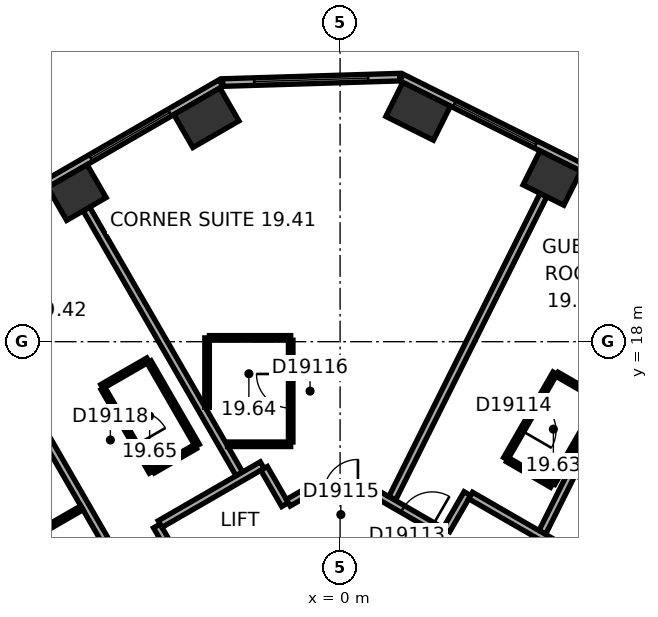
"""IFC4 building model, lengths in metres.
Left out: names, types, materials, properties, quantities, classifications, styles, units other than length and angle.
Written with IfcOpenShell. Run it as: python <this file> out.ifc"""

import sys

from ifc_helpers import new_model, si_unit, direction, frame, frame_2d, origin, origin_2d, place, context, subcontext, project, spatial, rectangle, extrude, element, fill, save


model = new_model("IFC4")
c1 = context("Model", 3, precision=1e-05, world=origin(), true_north=direction((0.0, 1.0)))
c2 = subcontext(c1, "Body", "Model", "MODEL_VIEW")
j1 = project(units=[si_unit("LENGTHUNIT", "METRE"), si_unit("PLANEANGLEUNIT", "RADIAN")], contexts=[c1])
p1 = place(None, origin())
s1 = spatial("IfcSite", under=j1, at=p1, CompositionType="ELEMENT")
p2 = place(p1, origin())
s2 = spatial("IfcBuilding", under=s1, at=p2, CompositionType="ELEMENT")
p3 = place(p2, frame((0.0, 0.0, 86.9)))
s3 = spatial("IfcBuildingStorey", under=s2, at=p3, CompositionType="ELEMENT", Elevation=86.9)
p4 = place(p3, frame((5.574, 22.306, 0.0), z_axis=(0.0, 0.0, 1.0), x_axis=(-0.894934361602, 0.44619781311, 0.0)))
e1 = element("IfcColumn", 1, at=p4, inside=s3, PredefinedType="COLUMN", context=c2, shape_type="SweptSolid", body=[
    extrude(rectangle(XDim=1.2, YDim=1.0, at=origin_2d()), origin(), (0.0, 0.0, 1.0), 3.3),
])
for number, where, z_axis, x_axis in (
    (2, (2.053, 24.062, 0.0), (0.0, 0.0, 1.0), (-0.895, 0.446, 0.0)),
    (3, (-3.518, 23.892, 0.0), (0.0, 0.0, 1.0), (-0.866, -0.5, 0.0)),
):
    element("IfcColumn", number, at=place(p3, frame(where, z_axis=z_axis, x_axis=x_axis)), inside=s3, PredefinedType="COLUMN", context=c2, shape_type="SweptSolid", body=[
        extrude(rectangle(XDim=1.4, YDim=1.0, at=origin_2d()), origin(), (0.0, 0.0, 1.0), 3.3),
    ])
p5 = place(p3, frame((-6.926, 21.925, 0.0), z_axis=(0.0, 0.0, 1.0), x_axis=(-0.866025403784, -0.5, 0.0)))
e4 = element("IfcColumn", 4, at=p5, inside=s3, PredefinedType="COLUMN", context=c2, shape_type="SweptSolid", body=[
    extrude(rectangle(XDim=1.2, YDim=1.0, at=origin_2d()), origin(), (0.0, 0.0, 1.0), 3.3),
])
p6 = place(p3, frame((20.63, 15.47, 0.0), z_axis=(0.0, 0.0, 1.0), x_axis=(-0.894934518609, 0.446197498203, 0.0)))
e5 = element("IfcWall", 5, at=p6, inside=s3, PredefinedType="STANDARD", context=c2, shape_type="SweptSolid", body=[
    extrude(rectangle(XDim=21.246, YDim=0.2, at=frame_2d((10.623, 0.0))), origin(), (0.0, 0.0, 1.0), 3.3),
])
p7 = place(p6, frame((1.553, 0.0, 0.8)))
e6 = element("IfcOpeningElement", 6, at=p7, cuts=e5, PredefinedType="OPENING", context=c2, shape_type="SweptSolid", body=[
    extrude(rectangle(XDim=2.4, YDim=1.7, at=frame_2d((1.2, 0.85))), frame((0.0, 0.11, 0.0), z_axis=(0.0, -1.0, 0.0), x_axis=(1.0, 0.0, 0.0)), (0.0, 0.0, 1.0), 0.22),
])
p8 = place(p6, frame((5.488, 0.0, 0.8)))
e7 = element("IfcOpeningElement", 7, at=p8, cuts=e5, PredefinedType="OPENING", context=c2, shape_type="SweptSolid", body=[
    extrude(rectangle(XDim=2.4, YDim=1.7, at=frame_2d((1.2, 0.85))), frame((0.0, 0.11, 0.0), z_axis=(0.0, -1.0, 0.0), x_axis=(1.0, 0.0, 0.0)), (0.0, 0.0, 1.0), 0.22),
])
p9 = place(p6, frame((9.422, 0.0, 0.8)))
e8 = element("IfcOpeningElement", 8, at=p9, cuts=e5, PredefinedType="OPENING", context=c2, shape_type="SweptSolid", body=[
    extrude(rectangle(XDim=2.4, YDim=1.7, at=frame_2d((1.2, 0.85))), frame((0.0, 0.11, 0.0), z_axis=(0.0, -1.0, 0.0), x_axis=(1.0, 0.0, 0.0)), (0.0, 0.0, 1.0), 0.22),
])
p10 = place(p6, frame((13.357, 0.0, 0.8)))
e9 = element("IfcOpeningElement", 9, at=p10, cuts=e5, PredefinedType="OPENING", context=c2, shape_type="SweptSolid", body=[
    extrude(rectangle(XDim=2.4, YDim=1.7, at=frame_2d((1.2, 0.85))), frame((0.0, 0.11, 0.0), z_axis=(0.0, -1.0, 0.0), x_axis=(1.0, 0.0, 0.0)), (0.0, 0.0, 1.0), 0.22),
])
p11 = place(p6, frame((17.292, 0.0, 0.8)))
e10 = element("IfcOpeningElement", 10, at=p11, cuts=e5, PredefinedType="OPENING", context=c2, shape_type="SweptSolid", body=[
    extrude(rectangle(XDim=2.4, YDim=1.7, at=frame_2d((1.2, 0.85))), frame((0.0, 0.11, 0.0), z_axis=(0.0, -1.0, 0.0), x_axis=(1.0, 0.0, 0.0)), (0.0, 0.0, 1.0), 0.22),
])
p12 = place(p3, frame((1.568, 24.961, 0.0), z_axis=(0.0, 0.0, 1.0), x_axis=(-0.999533359013, -0.030546099927, 0.0)))
e11 = element("IfcWall", 11, at=p12, inside=s3, PredefinedType="STANDARD", context=c2, shape_type="SweptSolid", body=[
    extrude(rectangle(XDim=4.66, YDim=0.2, at=frame_2d((2.33, 0.0))), origin(), (0.0, 0.0, 1.0), 3.3),
])
p13 = place(p12, frame((0.83, 0.0, 0.8)))
e12 = element("IfcOpeningElement", 12, at=p13, cuts=e11, PredefinedType="OPENING", context=c2, shape_type="SweptSolid", body=[
    extrude(rectangle(XDim=3.0, YDim=1.7, at=frame_2d((1.5, 0.85))), frame((0.0, 0.11, 0.0), z_axis=(0.0, -1.0, 0.0), x_axis=(1.0, 0.0, 0.0)), (0.0, 0.0, 1.0), 0.22),
])
p14 = place(p3, frame((-3.136, 24.805, 0.0), z_axis=(0.0, 0.0, 1.0), x_axis=(-0.866028291626, -0.499994998079, 0.0)))
e13 = element("IfcWall", 13, at=p14, inside=s3, PredefinedType="STANDARD", context=c2, shape_type="SweptSolid", body=[
    extrude(rectangle(XDim=21.246, YDim=0.2, at=frame_2d((10.623, 0.0))), origin(), (0.0, 0.0, 1.0), 3.3),
])
p15 = place(p14, frame((1.555, 0.0, 0.8)))
e14 = element("IfcOpeningElement", 14, at=p15, cuts=e13, PredefinedType="OPENING", context=c2, shape_type="SweptSolid", body=[
    extrude(rectangle(XDim=2.4, YDim=1.7, at=frame_2d((1.2, 0.85))), frame((0.0, 0.11, 0.0), z_axis=(0.0, -1.0, 0.0), x_axis=(1.0, 0.0, 0.0)), (0.0, 0.0, 1.0), 0.22),
])
p16 = place(p14, frame((5.489, 0.0, 0.8)))
e15 = element("IfcOpeningElement", 15, at=p16, cuts=e13, PredefinedType="OPENING", context=c2, shape_type="SweptSolid", body=[
    extrude(rectangle(XDim=2.4, YDim=1.7, at=frame_2d((1.2, 0.85))), frame((0.0, 0.11, 0.0), z_axis=(0.0, -1.0, 0.0), x_axis=(1.0, 0.0, 0.0)), (0.0, 0.0, 1.0), 0.22),
])
p17 = place(p14, frame((9.424, 0.0, 0.8)))
e16 = element("IfcOpeningElement", 16, at=p17, cuts=e13, PredefinedType="OPENING", context=c2, shape_type="SweptSolid", body=[
    extrude(rectangle(XDim=2.4, YDim=1.7, at=frame_2d((1.2, 0.85))), frame((0.0, 0.11, 0.0), z_axis=(0.0, -1.0, 0.0), x_axis=(1.0, 0.0, 0.0)), (0.0, 0.0, 1.0), 0.22),
])
p18 = place(p14, frame((13.358, 0.0, 0.8)))
e17 = element("IfcOpeningElement", 17, at=p18, cuts=e13, PredefinedType="OPENING", context=c2, shape_type="SweptSolid", body=[
    extrude(rectangle(XDim=2.4, YDim=1.7, at=frame_2d((1.2, 0.85))), frame((0.0, 0.11, 0.0), z_axis=(0.0, -1.0, 0.0), x_axis=(1.0, 0.0, 0.0)), (0.0, 0.0, 1.0), 0.22),
])
p19 = place(p14, frame((17.293, 0.0, 0.8)))
e18 = element("IfcOpeningElement", 18, at=p19, cuts=e13, PredefinedType="OPENING", context=c2, shape_type="SweptSolid", body=[
    extrude(rectangle(XDim=2.4, YDim=1.7, at=frame_2d((1.2, 0.85))), frame((0.0, 0.11, 0.0), z_axis=(0.0, -1.0, 0.0), x_axis=(1.0, 0.0, 0.0)), (0.0, 0.0, 1.0), 0.22),
])
p20 = place(p3, frame((-10.083, 19.524, 0.0), z_axis=(0.0, 0.0, 1.0), x_axis=(0.499999662836, -0.866025598446, 0.0)))
e19 = element("IfcWall", 19, at=p20, inside=s3, PredefinedType="PARTITIONING", context=c2, shape_type="SweptSolid", body=[
    extrude(rectangle(XDim=9.25, YDim=0.2, at=frame_2d((4.625, 0.0))), origin(), (0.0, 0.0, 1.0), 2.6),
])
p21 = place(p3, frame((-8.44, 12.679, 0.0), z_axis=(0.0, 0.0, 1.0), x_axis=(0.866044365799, 0.499967155389, 0.0)))
e20 = element("IfcWall", 20, at=p21, inside=s3, PredefinedType="PARTITIONING", context=c2, shape_type="SweptSolid", body=[
    extrude(rectangle(XDim=1.9, YDim=0.12, at=frame_2d((0.95, 0.0))), origin(), (0.0, 0.0, 1.0), 3.05),
])
p22 = place(p3, frame((-6.676, 21.492, 0.0), z_axis=(0.0, 0.0, 1.0), x_axis=(0.500011263043, -0.866018900966, 0.0)))
e21 = element("IfcWall", 21, at=p22, inside=s3, PredefinedType="PARTITIONING", context=c2, shape_type="SweptSolid", body=[
    extrude(rectangle(XDim=8.049, YDim=0.2, at=frame_2d((4.024, 0.0))), origin(), (0.0, 0.0, 1.0), 3.05),
])
p23 = place(p3, frame((-6.268, 16.82, 0.0), z_axis=(0.0, 0.0, 1.0), x_axis=(0.866002662425, 0.500039387122, 0.0)))
e22 = element("IfcWall", 22, at=p23, inside=s3, PredefinedType="PARTITIONING", context=c2, shape_type="SweptSolid", body=[
    extrude(rectangle(XDim=1.4, YDim=0.12, at=frame_2d((0.7, 0.0))), origin(), (0.0, 0.0, 1.0), 3.05),
])
p24 = place(p3, frame((-5.026, 17.469, 0.0), z_axis=(0.0, 0.0, 1.0), x_axis=(0.500005339912, -0.866022320763, 0.0)))
e23 = element("IfcWall", 23, at=p24, inside=s3, PredefinedType="PARTITIONING", context=c2, shape_type="SweptSolid", body=[
    extrude(rectangle(XDim=2.54, YDim=0.12, at=frame_2d((1.27, 0.0))), origin(), (0.0, 0.0, 1.0), 3.05),
])
p25 = place(p3, frame((-4.968, 14.569, 0.0), z_axis=(0.0, 0.0, 1.0), x_axis=(-0.500046963369, 0.865998287773, 0.0)))
e24 = element("IfcWall", 24, at=p25, inside=s3, PredefinedType="PARTITIONING", context=c2, shape_type="SweptSolid", body=[
    extrude(rectangle(XDim=2.54, YDim=0.12, at=frame_2d((1.27, 0.0))), origin(), (0.0, 0.0, 1.0), 3.05),
])
p26 = place(p25, frame((0.82, 0.0, 0.0)))
e25 = element("IfcOpeningElement", 25, at=p26, cuts=e24, PredefinedType="OPENING", context=c2, shape_type="SweptSolid", body=[
    extrude(rectangle(XDim=0.9, YDim=2.1, at=frame_2d((0.45, 1.05))), frame((0.0, 0.07, 0.0), z_axis=(0.0, -1.0, 0.0), x_axis=(1.0, 0.0, 0.0)), (0.0, 0.0, 1.0), 0.14),
])
p27 = place(p3, frame((-4.823, 13.152, 0.0), z_axis=(0.0, 0.0, 1.0), x_axis=(0.499986357472, -0.866033280158, 0.0)))
e26 = element("IfcWall", 26, at=p27, inside=s3, PredefinedType="PARTITIONING", context=c2, shape_type="SweptSolid", body=[
    extrude(rectangle(XDim=1.201, YDim=0.2, at=frame_2d((0.601, 0.0))), origin(), (0.0, 0.0, 1.0), 3.05),
])
p28 = place(p3, frame((-3.808, 15.239, 0.0), z_axis=(0.0, 0.0, 1.0), x_axis=(-0.866087136806, -0.499893060024, 0.0)))
e27 = element("IfcWall", 27, at=p28, inside=s3, PredefinedType="PARTITIONING", context=c2, shape_type="SweptSolid", body=[
    extrude(rectangle(XDim=1.28, YDim=0.12, at=frame_2d((0.64, 0.0))), origin(), (0.0, 0.0, 1.0), 3.05),
])
p29 = place(p3, frame((-3.5, 16.271, 0.0), z_axis=(0.0, 0.0, 1.0), x_axis=(0.0, 1.0, 0.0)))
e28 = element("IfcWall", 28, at=p29, inside=s3, PredefinedType="PARTITIONING", context=c2, shape_type="SweptSolid", body=[
    extrude(rectangle(XDim=1.829, YDim=0.12, at=frame_2d((0.915, 0.0))), origin(), (0.0, 0.0, 1.0), 3.05),
])
p30 = place(p3, frame((-3.44, 18.101, 0.0), z_axis=(0.0, 0.0, 1.0), x_axis=(1.0, 0.0, 0.0)))
e29 = element("IfcWall", 29, at=p30, inside=s3, PredefinedType="PARTITIONING", context=c2, shape_type="SweptSolid", body=[
    extrude(rectangle(XDim=2.14, YDim=0.12, at=frame_2d((1.07, 0.0))), origin(), (0.0, 0.0, 1.0), 3.05),
])
p31 = place(p3, frame((-2.05, 14.752, 0.0), z_axis=(0.0, 0.0, 1.0), x_axis=(-0.866030936828, -0.499990416364, 0.0)))
e30 = element("IfcWall", 30, at=p31, inside=s3, PredefinedType="PARTITIONING", context=c2, shape_type="SweptSolid", body=[
    extrude(rectangle(XDim=3.102, YDim=0.2, at=frame_2d((1.551, 0.0))), origin(), (0.0, 0.0, 1.0), 3.05),
])
p32 = place(p3, frame((-1.449, 13.712, 0.0), z_axis=(0.0, 0.0, 1.0), x_axis=(-0.499978356969, 0.866037899034, 0.0)))
e31 = element("IfcWall", 31, at=p32, inside=s3, PredefinedType="PARTITIONING", context=c2, shape_type="SweptSolid", body=[
    extrude(rectangle(XDim=1.101, YDim=0.2, at=frame_2d((0.551, 0.0))), origin(), (0.0, 0.0, 1.0), 3.05),
])
p33 = place(p3, frame((-1.3, 15.301, 0.0), z_axis=(0.0, 0.0, 1.0), x_axis=(-1.0, 0.0, 0.0)))
e32 = element("IfcWall", 32, at=p33, inside=s3, PredefinedType="PARTITIONING", context=c2, shape_type="SweptSolid", body=[
    extrude(rectangle(XDim=1.661, YDim=0.12, at=frame_2d((0.831, 0.0))), origin(), (0.0, 0.0, 1.0), 3.05),
])
p34 = place(p3, frame((-1.3, 18.041, 0.0), z_axis=(0.0, 0.0, 1.0), x_axis=(0.0, -1.0, 0.0)))
e33 = element("IfcWall", 33, at=p34, inside=s3, PredefinedType="PARTITIONING", context=c2, shape_type="SweptSolid", body=[
    extrude(rectangle(XDim=2.68, YDim=0.12, at=frame_2d((1.34, 0.0))), origin(), (0.0, 0.0, 1.0), 3.05),
])
p35 = place(p34, frame((0.89, 0.0, 0.0)))
e34 = element("IfcOpeningElement", 34, at=p35, cuts=e33, PredefinedType="OPENING", context=c2, shape_type="SweptSolid", body=[
    extrude(rectangle(XDim=0.9, YDim=2.1, at=frame_2d((0.45, 1.05))), frame((0.0, 0.07, 0.0), z_axis=(0.0, -1.0, 0.0), x_axis=(1.0, 0.0, 0.0)), (0.0, 0.0, 1.0), 0.14),
])
p36 = place(p3, frame((-0.95, 14.001, 0.0), z_axis=(0.0, 0.0, 1.0), x_axis=(-0.86609177584, -0.499885022602, 0.0)))
e35 = element("IfcWall", 35, at=p36, inside=s3, PredefinedType="PARTITIONING", context=c2, shape_type="SweptSolid", body=[
    extrude(rectangle(XDim=0.477, YDim=0.2, at=frame_2d((0.238, 0.0))), origin(), (0.0, 0.0, 1.0), 3.05),
])
p37 = place(p3, frame((0.95, 14.001, 0.0), z_axis=(0.0, 0.0, 1.0), x_axis=(-1.0, 0.0, 0.0)))
e36 = element("IfcWall", 36, at=p37, inside=s3, PredefinedType="PARTITIONING", context=c2, shape_type="SweptSolid", body=[
    extrude(rectangle(XDim=1.86, YDim=0.2, at=frame_2d((0.93, 0.0))), origin(), (0.0, 0.0, 1.0), 3.05),
])
p38 = place(p37, frame((0.48, 0.0, 0.0)))
e37 = element("IfcOpeningElement", 37, at=p38, cuts=e36, PredefinedType="OPENING", context=c2, shape_type="SweptSolid", body=[
    extrude(rectangle(XDim=0.9, YDim=2.1, at=frame_2d((0.45, 1.05))), frame((0.0, 0.11, 0.0), z_axis=(0.0, -1.0, 0.0), x_axis=(1.0, 0.0, 0.0)), (0.0, 0.0, 1.0), 0.22),
])
p39 = place(p3, frame((2.748, 12.962, 0.0), z_axis=(0.0, 0.0, 1.0), x_axis=(-0.866013897511, 0.50001992892, 0.0)))
e38 = element("IfcWall", 38, at=p39, inside=s3, PredefinedType="PARTITIONING", context=c2, shape_type="SweptSolid", body=[
    extrude(rectangle(XDim=2.037, YDim=0.2, at=frame_2d((1.018, 0.0))), origin(), (0.0, 0.0, 1.0), 3.05),
])
p40 = place(p39, frame((0.372, 0.0, 0.0)))
e39 = element("IfcOpeningElement", 39, at=p40, cuts=e38, PredefinedType="OPENING", context=c2, shape_type="SweptSolid", body=[
    extrude(rectangle(XDim=0.9, YDim=2.1, at=frame_2d((0.45, 1.05))), frame((0.0, 0.11, 0.0), z_axis=(0.0, -1.0, 0.0), x_axis=(1.0, 0.0, 0.0)), (0.0, 0.0, 1.0), 0.22),
])
p41 = place(p3, frame((3.349, 14.002, 0.0), z_axis=(0.0, 0.0, 1.0), x_axis=(-0.500074377092, -0.865982457891, 0.0)))
e40 = element("IfcWall", 40, at=p41, inside=s3, PredefinedType="PARTITIONING", context=c2, shape_type="SweptSolid", body=[
    extrude(rectangle(XDim=1.101, YDim=0.2, at=frame_2d((0.55, 0.0))), origin(), (0.0, 0.0, 1.0), 3.05),
])
p42 = place(p3, frame((4.356, 14.922, 0.0), z_axis=(0.0, 0.0, 1.0), x_axis=(0.499936506574, 0.866062058628, 0.0)))
e41 = element("IfcWall", 41, at=p42, inside=s3, PredefinedType="PARTITIONING", context=c2, shape_type="SweptSolid", body=[
    extrude(rectangle(XDim=2.6, YDim=0.12, at=frame_2d((1.3, 0.0))), origin(), (0.0, 0.0, 1.0), 3.05),
])
p43 = place(p42, frame((0.85, 0.0, 0.0)))
e42 = element("IfcOpeningElement", 42, at=p43, cuts=e41, PredefinedType="OPENING", context=c2, shape_type="SweptSolid", body=[
    extrude(rectangle(XDim=0.9, YDim=2.1, at=frame_2d((0.45, 1.05))), frame((0.0, 0.07, 0.0), z_axis=(0.0, -1.0, 0.0), x_axis=(1.0, 0.0, 0.0)), (0.0, 0.0, 1.0), 0.14),
])
p44 = place(p3, frame((5.351, 21.859, 0.0), z_axis=(0.0, 0.0, 1.0), x_axis=(-0.446205309328, -0.894930624086, 0.0)))
e43 = element("IfcWall", 43, at=p44, inside=s3, PredefinedType="PARTITIONING", context=c2, shape_type="SweptSolid", body=[
    extrude(rectangle(XDim=8.913, YDim=0.2, at=frame_2d((4.457, 0.0))), origin(), (0.0, 0.0, 1.0), 2.6),
])
p45 = place(p3, frame((5.569, 14.222, 0.0), z_axis=(0.0, 0.0, 1.0), x_axis=(-0.866036909293, 0.499980071345, 0.0)))
e44 = element("IfcWall", 44, at=p45, inside=s3, PredefinedType="PARTITIONING", context=c2, shape_type="SweptSolid", body=[
    extrude(rectangle(XDim=1.34, YDim=0.12, at=frame_2d((0.67, 0.0))), origin(), (0.0, 0.0, 1.0), 3.05),
])
p46 = place(p3, frame((5.708, 17.144, 0.0), z_axis=(0.0, 0.0, 1.0), x_axis=(0.866082447003, -0.499901185229, 0.0)))
e45 = element("IfcWall", 45, at=p46, inside=s3, PredefinedType="PARTITIONING", context=c2, shape_type="SweptSolid", body=[
    extrude(rectangle(XDim=1.34, YDim=0.12, at=frame_2d((0.67, 0.0))), origin(), (0.0, 0.0, 1.0), 3.05),
])
p47 = place(p3, frame((6.839, 16.422, 0.0), z_axis=(0.0, 0.0, 1.0), x_axis=(-0.50000366821, -0.866023285932, 0.0)))
e46 = element("IfcWall", 46, at=p47, inside=s3, PredefinedType="PARTITIONING", context=c2, shape_type="SweptSolid", body=[
    extrude(rectangle(XDim=2.48, YDim=0.12, at=frame_2d((1.24, 0.0))), origin(), (0.0, 0.0, 1.0), 3.05),
])
p48 = place(p3, frame((8.872, 20.104, 0.0), z_axis=(0.0, 0.0, 1.0), x_axis=(-0.446218378653, -0.894924107706, 0.0)))
e47 = element("IfcWall", 47, at=p48, inside=s3, PredefinedType="PARTITIONING", context=c2, shape_type="SweptSolid", body=[
    extrude(rectangle(XDim=7.95, YDim=0.2, at=frame_2d((3.975, 0.0))), origin(), (0.0, 0.0, 1.0), 3.05),
])
p49 = place(p3, frame((10.885, 9.652, 0.0), z_axis=(0.0, 0.0, 1.0), x_axis=(-0.866033868542, 0.499985338323, 0.0)))
e48 = element("IfcWall", 48, at=p49, inside=s3, PredefinedType="PARTITIONING", context=c2, shape_type="SweptSolid", body=[
    extrude(rectangle(XDim=8.602, YDim=0.2, at=frame_2d((4.301, 0.0))), origin(), (0.0, 0.0, 1.0), 3.05),
])
p50 = place(p49, frame((2.739, 0.0, 0.0)))
e49 = element("IfcOpeningElement", 49, at=p50, cuts=e48, PredefinedType="OPENING", context=c2, shape_type="SweptSolid", body=[
    extrude(rectangle(XDim=1.0, YDim=2.1, at=frame_2d((0.5, 1.05))), frame((0.0, 0.11, 0.0), z_axis=(0.0, -1.0, 0.0), x_axis=(1.0, 0.0, 0.0)), (0.0, 0.0, 1.0), 0.22),
])
p51 = place(p3, frame((12.866, 10.702, 0.0), z_axis=(0.0, 0.0, 1.0), x_axis=(-0.866023151433, 0.500003901167, 0.0)))
e50 = element("IfcWall", 50, at=p51, inside=s3, PredefinedType="PARTITIONING", context=c2, shape_type="SweptSolid", body=[
    extrude(rectangle(XDim=7.684, YDim=0.12, at=frame_2d((3.842, 0.0))), origin(), (0.0, 0.0, 1.0), 3.05),
])
p52 = place(p51, frame((0.55, 0.0, 0.0)))
e51 = element("IfcOpeningElement", 51, at=p52, cuts=e50, PredefinedType="OPENING", context=c2, shape_type="SweptSolid", body=[
    extrude(rectangle(XDim=1.0, YDim=2.1, at=frame_2d((0.5, 1.05))), frame((0.0, 0.07, 0.0), z_axis=(0.0, -1.0, 0.0), x_axis=(1.0, 0.0, 0.0)), (0.0, 0.0, 1.0), 0.14),
])
p53 = place(p51, frame((2.8, 0.0, 0.0)))
e52 = element("IfcOpeningElement", 52, at=p53, cuts=e50, PredefinedType="OPENING", context=c2, shape_type="SweptSolid", body=[
    extrude(rectangle(XDim=0.9, YDim=2.1, at=frame_2d((0.45, 1.05))), frame((0.0, 0.07, 0.0), z_axis=(0.0, -1.0, 0.0), x_axis=(1.0, 0.0, 0.0)), (0.0, 0.0, 1.0), 0.14),
])
p54 = place(p51, frame((5.592, 0.0, 0.0)))
e53 = element("IfcOpeningElement", 53, at=p54, cuts=e50, PredefinedType="OPENING", context=c2, shape_type="SweptSolid", body=[
    extrude(rectangle(XDim=0.9, YDim=2.1, at=frame_2d((0.45, 1.05))), frame((0.0, 0.07, 0.0), z_axis=(0.0, -1.0, 0.0), x_axis=(1.0, 0.0, 0.0)), (0.0, 0.0, 1.0), 0.14),
])
p55 = place(p11, origin())
e54 = element("IfcWindow", 54, at=p55, inside=s3, PartitioningType="SINGLE_PANEL", PredefinedType="WINDOW", context=c2, shape_type="SweptSolid", body=[
    extrude(rectangle(XDim=2.4, YDim=1.7, at=frame_2d((1.2, 0.85))), frame((0.0, 0.03, 0.0), z_axis=(0.0, -1.0, 0.0), x_axis=(1.0, 0.0, 0.0)), (0.0, 0.0, 1.0), 0.06),
])
fill(e10, e54)
p56 = place(p13, origin())
e55 = element("IfcWindow", 55, at=p56, inside=s3, PartitioningType="SINGLE_PANEL", PredefinedType="WINDOW", context=c2, shape_type="SweptSolid", body=[
    extrude(rectangle(XDim=3.0, YDim=1.7, at=frame_2d((1.5, 0.85))), frame((0.0, 0.03, 0.0), z_axis=(0.0, -1.0, 0.0), x_axis=(1.0, 0.0, 0.0)), (0.0, 0.0, 1.0), 0.06),
])
fill(e12, e55)
p57 = place(p15, origin())
e56 = element("IfcWindow", 56, at=p57, inside=s3, PartitioningType="SINGLE_PANEL", PredefinedType="WINDOW", context=c2, shape_type="SweptSolid", body=[
    extrude(rectangle(XDim=2.4, YDim=1.7, at=frame_2d((1.2, 0.85))), frame((0.0, 0.03, 0.0), z_axis=(0.0, -1.0, 0.0), x_axis=(1.0, 0.0, 0.0)), (0.0, 0.0, 1.0), 0.06),
])
fill(e14, e56)
p58 = place(p40, origin())
e57 = element("IfcDoor", 57, at=p58, inside=s3, OperationType="SINGLE_SWING_LEFT", PredefinedType="DOOR", context=c2, shape_type="SweptSolid", body=[
    extrude(rectangle(XDim=0.9, YDim=2.1, at=frame_2d((0.45, 1.05))), frame((0.0, 0.025, 0.0), z_axis=(0.0, -1.0, 0.0), x_axis=(1.0, 0.0, 0.0)), (0.0, 0.0, 1.0), 0.05),
])
fill(e39, e57)
p59 = place(p43, origin())
e58 = element("IfcDoor", 58, at=p59, inside=s3, OperationType="SINGLE_SWING_LEFT", PredefinedType="DOOR", context=c2, shape_type="SweptSolid", body=[
    extrude(rectangle(XDim=0.9, YDim=2.1, at=frame_2d((0.45, 1.05))), frame((0.0, 0.025, 0.0), z_axis=(0.0, -1.0, 0.0), x_axis=(1.0, 0.0, 0.0)), (0.0, 0.0, 1.0), 0.05),
])
fill(e42, e58)
p60 = place(p38, origin())
e59 = element("IfcDoor", 59, at=p60, inside=s3, OperationType="SINGLE_SWING_LEFT", PredefinedType="DOOR", context=c2, shape_type="SweptSolid", body=[
    extrude(rectangle(XDim=0.9, YDim=2.1, at=frame_2d((0.45, 1.05))), frame((0.0, 0.025, 0.0), z_axis=(0.0, -1.0, 0.0), x_axis=(1.0, 0.0, 0.0)), (0.0, 0.0, 1.0), 0.05),
])
fill(e37, e59)
p61 = place(p35, origin())
e60 = element("IfcDoor", 60, at=p61, inside=s3, OperationType="SINGLE_SWING_LEFT", PredefinedType="DOOR", context=c2, shape_type="SweptSolid", body=[
    extrude(rectangle(XDim=0.9, YDim=2.1, at=frame_2d((0.45, 1.05))), frame((0.0, 0.025, 0.0), z_axis=(0.0, -1.0, 0.0), x_axis=(1.0, 0.0, 0.0)), (0.0, 0.0, 1.0), 0.05),
])
fill(e34, e60)
p62 = place(p26, origin())
e61 = element("IfcDoor", 61, at=p62, inside=s3, OperationType="SINGLE_SWING_LEFT", PredefinedType="DOOR", context=c2, shape_type="SweptSolid", body=[
    extrude(rectangle(XDim=0.9, YDim=2.1, at=frame_2d((0.45, 1.05))), frame((0.0, 0.025, 0.0), z_axis=(0.0, -1.0, 0.0), x_axis=(1.0, 0.0, 0.0)), (0.0, 0.0, 1.0), 0.05),
])
fill(e25, e61)
save(model, sys.argv[1])
